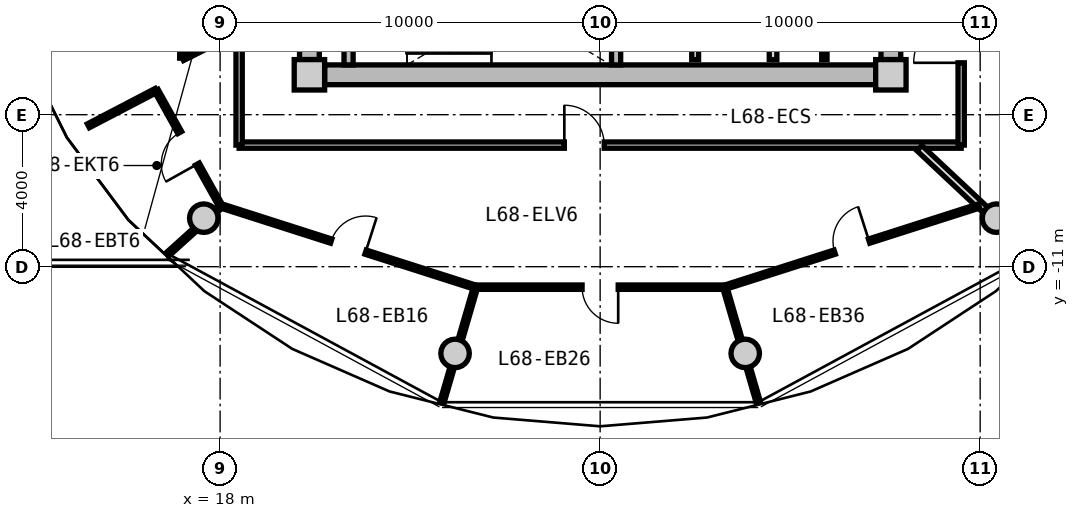
"""IFC4 building model, lengths in metres.
Left out: names, types, materials, properties, quantities, classifications, styles, units other than length and angle.
Written with IfcOpenShell. Run it as: python <this file> out.ifc"""

import sys

from ifc_helpers import new_model, si_unit, direction, frame, frame_2d, origin, origin_2d, place, context, subcontext, project, spatial, rectangle, circle, extrude, source, transform, mapped, element, fill, save


model = new_model("IFC4")
c1 = context("Model", 3, precision=1e-05, world=origin(), true_north=direction((0.0, 1.0)))
c2 = subcontext(c1, "Body", "Model", "MODEL_VIEW")
j1 = project(units=[si_unit("LENGTHUNIT", "METRE"), si_unit("PLANEANGLEUNIT", "RADIAN")], contexts=[c1])
p1 = place(None, origin())
s1 = spatial("IfcSite", under=j1, at=p1, CompositionType="ELEMENT")
p2 = place(p1, origin())
s2 = spatial("IfcBuilding", under=s1, at=p2, CompositionType="ELEMENT")
p3 = place(p2, frame((0.0, 0.0, 220.0)))
s3 = spatial("IfcBuildingStorey", under=s2, at=p3, CompositionType="ELEMENT", Elevation=220.0)
m1 = source(origin(), c2, "Body", "SweptSolid", [
    extrude(rectangle(XDim=0.8, YDim=0.8, at=origin_2d()), origin(), (0.0, 0.0, 1.0), 3.05),
])
for number, where, z_axis, x_axis in (
    (1, (20.35, -5.95, 0.0), (0.0, 0.0, 1.0), (1.0, 0.0, 0.0)),
    (2, (35.65, -5.95, 0.0), (0.0, 0.0, 1.0), (1.0, 0.0, 0.0)),
):
    element("IfcColumn", number, at=place(p3, frame(where, z_axis=z_axis, x_axis=x_axis)), inside=s3, PredefinedType="COLUMN", context=c2, shape_type="MappedRepresentation", body=[
        mapped(m1, transform((0.0, 0.0, 0.0), x_axis=(1.0, 0.0, 0.0), y_axis=(0.0, 1.0, 0.0), z_axis=(0.0, 0.0, 1.0), scale=1.0)),
    ])
m2 = source(origin(), c2, "Body", "SweptSolid", [
    extrude(rectangle(XDim=14.5, YDim=0.52, at=frame_2d((7.25, 0.0))), origin(), (0.0, 0.0, 1.0), 2.76),
])
p4 = place(p3, frame((35.25, -5.95, 0.0), z_axis=(0.0, 0.0, 1.0), x_axis=(-1.0, 0.0, 0.0)))
e3 = element("IfcWall", 3, at=p4, inside=s3, PredefinedType="SHEAR", context=c2, shape_type="MappedRepresentation", body=[
    mapped(m2, transform((0.0, 0.0, 0.0), x_axis=(1.0, 0.0, 0.0), y_axis=(0.0, 1.0, 0.0), z_axis=(0.0, 0.0, 1.0), scale=1.0)),
])
m3 = source(origin(), c2, "Body", "SweptSolid", [
    extrude(rectangle(XDim=11.1, YDim=0.52, at=frame_2d((5.55, 0.0))), origin(), (0.0, 0.0, 1.0), 2.76),
])
p5 = place(p3, frame((20.35, -5.55, 0.0), z_axis=(0.0, 0.0, 1.0), x_axis=(0.0, 1.0, 0.0)))
e4 = element("IfcWall", 4, at=p5, inside=s3, PredefinedType="SHEAR", context=c2, shape_type="MappedRepresentation", body=[
    mapped(m3, transform((0.0, 0.0, 0.0), x_axis=(1.0, 0.0, 0.0), y_axis=(0.0, 1.0, 0.0), z_axis=(0.0, 0.0, 1.0), scale=1.0)),
])
p6 = place(p5, frame((3.8, 0.0, 0.0)))
e5 = element("IfcOpeningElement", 5, at=p6, cuts=e4, PredefinedType="OPENING", context=c2, shape_type="SweptSolid", body=[
    extrude(rectangle(XDim=1.2, YDim=2.15, at=frame_2d((0.6, 1.075))), frame((0.0, 0.27, 0.0), z_axis=(0.0, -1.0, 0.0), x_axis=(1.0, 0.0, 0.0)), (0.0, 0.0, 1.0), 0.54),
])
p7 = place(p3, frame((35.65, 5.55, 0.0), z_axis=(0.0, 0.0, 1.0), x_axis=(0.0, -1.0, 0.0)))
e6 = element("IfcWall", 6, at=p7, inside=s3, PredefinedType="SHEAR", context=c2, shape_type="MappedRepresentation", body=[
    mapped(m3, transform((0.0, 0.0, 0.0), x_axis=(1.0, 0.0, 0.0), y_axis=(0.0, 1.0, 0.0), z_axis=(0.0, 0.0, 1.0), scale=1.0)),
])
p8 = place(p7, frame((5.65, 0.0, 0.0)))
e7 = element("IfcOpeningElement", 7, at=p8, cuts=e6, PredefinedType="OPENING", context=c2, shape_type="SweptSolid", body=[
    extrude(rectangle(XDim=1.2, YDim=2.15, at=frame_2d((0.6, 1.075))), frame((0.0, 0.27, 0.0), z_axis=(0.0, -1.0, 0.0), x_axis=(1.0, 0.0, 0.0)), (0.0, 0.0, 1.0), 0.54),
])
m4 = source(origin(), c2, "Body", "SweptSolid", [
    extrude(circle(Radius=0.375, at=origin_2d()), origin(), (0.0, 0.0, 1.0), 3.05),
])
for number, where, z_axis, x_axis in (
    (8, (17.57, -9.723, 0.0), (0.0, 0.0, 1.0), (1.0, 0.0, 0.0)),
    (9, (24.182, -13.281, 0.0), (0.0, 0.0, 1.0), (1.0, 0.0, 0.0)),
    (10, (31.818, -13.281, 0.0), (0.0, 0.0, 1.0), (1.0, 0.0, 0.0)),
    (11, (38.43, -9.723, 0.0), (0.0, 0.0, 1.0), (1.0, 0.0, 0.0)),
):
    element("IfcColumn", number, at=place(p3, frame(where, z_axis=z_axis, x_axis=x_axis)), inside=s3, PredefinedType="COLUMN", context=c2, shape_type="MappedRepresentation", body=[
        mapped(m4, transform((0.0, 0.0, 0.0), x_axis=(1.0, 0.0, 0.0), y_axis=(0.0, 1.0, 0.0), z_axis=(0.0, 0.0, 1.0), scale=1.0)),
    ])
m5 = source(origin(), c2, "Body", "SweptSolid", [
    extrude(rectangle(XDim=3.24, YDim=0.24, at=frame_2d((1.62, 0.0))), origin(), (0.0, 0.0, 1.0), 2.76),
])
for number, where, z_axis, x_axis in (
    (12, (21.38, -5.69, 0.0), (0.0, 0.0, 1.0), (0.0, 1.0, 0.0)),
    (13, (28.42, -5.69, 0.0), (0.0, 0.0, 1.0), (0.0, 1.0, 0.0)),
):
    element("IfcWall", number, at=place(p3, frame(where, z_axis=z_axis, x_axis=x_axis)), inside=s3, PredefinedType="PARTITIONING", context=c2, shape_type="MappedRepresentation", body=[
        mapped(m5, transform((0.0, 0.0, 0.0), x_axis=(1.0, 0.0, 0.0), y_axis=(0.0, 1.0, 0.0), z_axis=(0.0, 0.0, 1.0), scale=1.0)),
    ])
m6 = source(origin(), c2, "Body", "SweptSolid", [
    extrude(rectangle(XDim=3.8, YDim=0.2, at=frame_2d((1.9, 0.0))), origin(), (0.0, 0.0, 1.0), 2.745),
])
p9 = place(p3, frame((32.55, -5.55, 0.0), z_axis=(0.0, 0.0, 1.0), x_axis=(0.0, 1.0, 0.0)))
e14 = element("IfcWall", 14, at=p9, inside=s3, PredefinedType="PARTITIONING", context=c2, shape_type="MappedRepresentation", body=[
    mapped(m6, transform((0.0, 0.0, 0.0), x_axis=(1.0, 0.0, 0.0), y_axis=(0.0, 1.0, 0.0), z_axis=(0.0, 0.0, 1.0), scale=1.0)),
])
m7 = source(origin(), c2, "Body", "SweptSolid", [
    extrude(rectangle(XDim=4.2, YDim=0.18, at=frame_2d((2.1, 0.0))), origin(), (0.0, 0.0, 1.0), 2.745),
])
p10 = place(p3, frame((30.5, -5.55, 0.0), z_axis=(0.0, 0.0, 1.0), x_axis=(0.0, 1.0, 0.0)))
e15 = element("IfcWall", 15, at=p10, inside=s3, PredefinedType="PARTITIONING", context=c2, shape_type="MappedRepresentation", body=[
    mapped(m7, transform((0.0, 0.0, 0.0), x_axis=(1.0, 0.0, 0.0), y_axis=(0.0, 1.0, 0.0), z_axis=(0.0, 0.0, 1.0), scale=1.0)),
])
m8 = source(origin(), c2, "Body", "SweptSolid", [
    extrude(rectangle(XDim=3.8, YDim=0.14, at=frame_2d((1.9, 0.0))), origin(), (0.0, 0.0, 1.0), 2.745),
])
p11 = place(p3, frame((33.9, -5.55, 0.0), z_axis=(0.0, 0.0, 1.0), x_axis=(0.0, 1.0, 0.0)))
e16 = element("IfcWall", 16, at=p11, inside=s3, PredefinedType="PARTITIONING", context=c2, shape_type="MappedRepresentation", body=[
    mapped(m8, transform((0.0, 0.0, 0.0), x_axis=(1.0, 0.0, 0.0), y_axis=(0.0, 1.0, 0.0), z_axis=(0.0, 0.0, 1.0), scale=1.0)),
])
m9 = source(origin(), c2, "Body", "SweptSolid", [
    extrude(rectangle(XDim=19.0, YDim=0.165, at=frame_2d((9.5, 0.0))), origin(), (0.0, 0.0, 1.0), 2.745),
])
p12 = place(p3, frame((37.5, -7.8, 0.0), z_axis=(0.0, 0.0, 1.0), x_axis=(-1.0, 0.0, 0.0)))
e17 = element("IfcWall", 17, at=p12, inside=s3, PredefinedType="PARTITIONING", context=c2, shape_type="MappedRepresentation", body=[
    mapped(m9, transform((0.0, 0.0, 0.0), x_axis=(1.0, 0.0, 0.0), y_axis=(0.0, 1.0, 0.0), z_axis=(0.0, 0.0, 1.0), scale=1.0)),
])
p13 = place(p12, frame((9.392, 0.0, 0.0)))
e18 = element("IfcOpeningElement", 18, at=p13, cuts=e17, PredefinedType="OPENING", context=c2, shape_type="SweptSolid", body=[
    extrude(rectangle(XDim=1.05, YDim=2.15, at=frame_2d((0.525, 1.075))), frame((0.0, 0.093, 0.0), z_axis=(0.0, -1.0, 0.0), x_axis=(1.0, 0.0, 0.0)), (0.0, 0.0, 1.0), 0.185),
])
m10 = source(origin(), c2, "Body", "SweptSolid", [
    extrude(rectangle(XDim=6.88, YDim=0.165, at=frame_2d((3.44, 0.0))), origin(), (0.0, 0.0, 1.0), 2.745),
])
p14 = place(p3, frame((18.5, -7.8, 0.0), z_axis=(0.0, 0.0, 1.0), x_axis=(0.0, 1.0, 0.0)))
e19 = element("IfcWall", 19, at=p14, inside=s3, PredefinedType="PARTITIONING", context=c2, shape_type="MappedRepresentation", body=[
    mapped(m10, transform((0.0, 0.0, 0.0), x_axis=(1.0, 0.0, 0.0), y_axis=(0.0, 1.0, 0.0), z_axis=(0.0, 0.0, 1.0), scale=1.0)),
])
p15 = place(p3, frame((37.5, -0.92, 0.0), z_axis=(0.0, 0.0, 1.0), x_axis=(0.0, -1.0, 0.0)))
e20 = element("IfcWall", 20, at=p15, inside=s3, PredefinedType="PARTITIONING", context=c2, shape_type="MappedRepresentation", body=[
    mapped(m10, transform((0.0, 0.0, 0.0), x_axis=(1.0, 0.0, 0.0), y_axis=(0.0, 1.0, 0.0), z_axis=(0.0, 0.0, 1.0), scale=1.0)),
])
p16 = place(p15, frame((3.464, 0.0, 0.0)))
e21 = element("IfcOpeningElement", 21, at=p16, cuts=e20, PredefinedType="OPENING", context=c2, shape_type="SweptSolid", body=[
    extrude(rectangle(XDim=1.25, YDim=2.2, at=frame_2d((0.625, 1.1))), frame((0.0, 0.093, 0.0), z_axis=(0.0, -1.0, 0.0), x_axis=(1.0, 0.0, 0.0)), (0.0, 0.0, 1.0), 0.185),
])
m11 = source(origin(), c2, "Body", "SweptSolid", [
    extrude(rectangle(XDim=4.089, YDim=0.19, at=frame_2d((2.044, 0.0))), origin(), (0.0, 0.0, 1.0), 2.345),
])
p17 = place(p3, frame((36.402, -7.88, 0.0), z_axis=(0.0, 0.0, 1.0), x_axis=(0.729401273609, -0.684086092577, 0.0)))
e22 = element("IfcWall", 22, at=p17, inside=s3, PredefinedType="PARTITIONING", context=c2, shape_type="MappedRepresentation", body=[
    mapped(m11, transform((0.0, 0.0, 0.0), x_axis=(1.0, 0.0, 0.0), y_axis=(0.0, 1.0, 0.0), z_axis=(0.0, 0.0, 1.0), scale=1.0)),
])
m12 = source(origin(), c2, "Body", "SweptSolid", [
    extrude(rectangle(XDim=7.024, YDim=0.115, at=frame_2d((3.512, 0.0))), origin(), (0.0, 0.0, 1.0), 2.745),
])
p18 = place(p3, frame((18.03, -9.401, 0.0), z_axis=(0.0, 0.0, 1.0), x_axis=(0.952454006655, -0.304682400552, 0.0)))
e23 = element("IfcWall", 23, at=p18, inside=s3, PredefinedType="PARTITIONING", context=c2, shape_type="MappedRepresentation", body=[
    mapped(m12, transform((0.0, 0.0, 0.0), x_axis=(1.0, 0.0, 0.0), y_axis=(0.0, 1.0, 0.0), z_axis=(0.0, 0.0, 1.0), scale=1.0)),
])
p19 = place(p18, frame((3.037, 0.0, 0.0)))
e24 = element("IfcOpeningElement", 24, at=p19, cuts=e23, PredefinedType="OPENING", context=c2, shape_type="SweptSolid", body=[
    extrude(rectangle(XDim=0.95, YDim=2.1, at=frame_2d((0.475, 1.05))), frame((0.0, 0.067, 0.0), z_axis=(0.0, -1.0, 0.0), x_axis=(1.0, 0.0, 0.0)), (0.0, 0.0, 1.0), 0.135),
])
m13 = source(origin(), c2, "Body", "SweptSolid", [
    extrude(rectangle(XDim=1.905, YDim=0.115, at=frame_2d((0.953, 0.0))), origin(), (0.0, 0.0, 1.0), 2.345),
])
p20 = place(p3, frame((18.03, -9.401, 0.0), z_axis=(0.0, 0.0, 1.0), x_axis=(-0.742624708137, -0.669707804094, 0.0)))
e25 = element("IfcWall", 25, at=p20, inside=s3, PredefinedType="PARTITIONING", context=c2, shape_type="MappedRepresentation", body=[
    mapped(m13, transform((0.0, 0.0, 0.0), x_axis=(1.0, 0.0, 0.0), y_axis=(0.0, 1.0, 0.0), z_axis=(0.0, 0.0, 1.0), scale=1.0)),
])
m14 = source(origin(), c2, "Body", "SweptSolid", [
    extrude(rectangle(XDim=6.558, YDim=0.115, at=frame_2d((3.279, 0.0))), origin(), (0.0, 0.0, 1.0), 2.745),
])
p21 = place(p3, frame((24.721, -11.539, 0.0), z_axis=(0.0, 0.0, 1.0), x_axis=(1.0, 0.0, 0.0)))
e26 = element("IfcWall", 26, at=p21, inside=s3, PredefinedType="PARTITIONING", context=c2, shape_type="MappedRepresentation", body=[
    mapped(m14, transform((0.0, 0.0, 0.0), x_axis=(1.0, 0.0, 0.0), y_axis=(0.0, 1.0, 0.0), z_axis=(0.0, 0.0, 1.0), scale=1.0)),
])
p22 = place(p21, frame((2.804, 0.0, 0.0)))
e27 = element("IfcOpeningElement", 27, at=p22, cuts=e26, PredefinedType="OPENING", context=c2, shape_type="SweptSolid", body=[
    extrude(rectangle(XDim=0.95, YDim=2.1, at=frame_2d((0.475, 1.05))), frame((0.0, 0.067, 0.0), z_axis=(0.0, -1.0, 0.0), x_axis=(1.0, 0.0, 0.0)), (0.0, 0.0, 1.0), 0.135),
])
m15 = source(origin(), c2, "Body", "SweptSolid", [
    extrude(rectangle(XDim=3.173, YDim=0.115, at=frame_2d((1.587, 0.0))), origin(), (0.0, 0.0, 1.0), 2.345),
])
p23 = place(p3, frame((24.721, -11.539, 0.0), z_axis=(0.0, 0.0, 1.0), x_axis=(-0.279878875918, -0.960035319566, 0.0)))
e28 = element("IfcWall", 28, at=p23, inside=s3, PredefinedType="PARTITIONING", context=c2, shape_type="MappedRepresentation", body=[
    mapped(m15, transform((0.0, 0.0, 0.0), x_axis=(1.0, 0.0, 0.0), y_axis=(0.0, 1.0, 0.0), z_axis=(0.0, 0.0, 1.0), scale=1.0)),
])
p24 = place(p3, frame((31.28, -11.542, 0.0), z_axis=(0.0, 0.0, 1.0), x_axis=(0.952454006655, 0.304682400552, 0.0)))
e29 = element("IfcWall", 29, at=p24, inside=s3, PredefinedType="PARTITIONING", context=c2, shape_type="MappedRepresentation", body=[
    mapped(m12, transform((0.0, 0.0, 0.0), x_axis=(1.0, 0.0, 0.0), y_axis=(0.0, 1.0, 0.0), z_axis=(0.0, 0.0, 1.0), scale=1.0)),
])
p25 = place(p24, frame((3.037, 0.0, 0.0)))
e30 = element("IfcOpeningElement", 30, at=p25, cuts=e29, PredefinedType="OPENING", context=c2, shape_type="SweptSolid", body=[
    extrude(rectangle(XDim=0.95, YDim=2.1, at=frame_2d((0.475, 1.05))), frame((0.0, 0.067, 0.0), z_axis=(0.0, -1.0, 0.0), x_axis=(1.0, 0.0, 0.0)), (0.0, 0.0, 1.0), 0.135),
])
m16 = source(origin(), c2, "Body", "SweptSolid", [
    extrude(rectangle(XDim=3.171, YDim=0.115, at=frame_2d((1.585, 0.0))), origin(), (0.0, 0.0, 1.0), 2.345),
])
p26 = place(p3, frame((31.28, -11.542, 0.0), z_axis=(0.0, 0.0, 1.0), x_axis=(0.279893554029, -0.960031040338, 0.0)))
e31 = element("IfcWall", 31, at=p26, inside=s3, PredefinedType="PARTITIONING", context=c2, shape_type="MappedRepresentation", body=[
    mapped(m16, transform((0.0, 0.0, 0.0), x_axis=(1.0, 0.0, 0.0), y_axis=(0.0, 1.0, 0.0), z_axis=(0.0, 0.0, 1.0), scale=1.0)),
])
m17 = source(origin(), c2, "Body", "SweptSolid", [
    extrude(rectangle(XDim=1.638, YDim=0.14, at=frame_2d((0.819, 0.0))), origin(), (0.0, 0.0, 1.0), 2.745),
])
p27 = place(p3, frame((18.47, -4.778, 0.0), z_axis=(0.0, 0.0, 1.0), x_axis=(-0.893919977945, -0.448226586707, 0.0)))
e32 = element("IfcWall", 32, at=p27, inside=s3, PredefinedType="PARTITIONING", context=c2, shape_type="MappedRepresentation", body=[
    mapped(m17, transform((0.0, 0.0, 0.0), x_axis=(1.0, 0.0, 0.0), y_axis=(0.0, 1.0, 0.0), z_axis=(0.0, 0.0, 1.0), scale=1.0)),
])
m18 = source(origin(), c2, "Body", "SweptSolid", [
    extrude(rectangle(XDim=2.759, YDim=0.14, at=frame_2d((1.379, 0.0))), origin(), (0.0, 0.0, 1.0), 2.745),
])
p28 = place(p3, frame((17.005, -5.513, 0.0), z_axis=(0.0, 0.0, 1.0), x_axis=(0.01194710728, 0.999928630767, 0.0)))
e33 = element("IfcWall", 33, at=p28, inside=s3, PredefinedType="PARTITIONING", context=c2, shape_type="MappedRepresentation", body=[
    mapped(m18, transform((0.0, 0.0, 0.0), x_axis=(1.0, 0.0, 0.0), y_axis=(0.0, 1.0, 0.0), z_axis=(0.0, 0.0, 1.0), scale=1.0)),
])
p29 = place(p28, frame((0.919, 0.0, 0.0)))
e34 = element("IfcOpeningElement", 34, at=p29, cuts=e33, PredefinedType="OPENING", context=c2, shape_type="SweptSolid", body=[
    extrude(rectangle(XDim=0.92, YDim=2.1, at=frame_2d((0.46, 1.05))), frame((0.0, 0.08, 0.0), z_axis=(0.0, -1.0, 0.0), x_axis=(1.0, 0.0, 0.0)), (0.0, 0.0, 1.0), 0.16),
])
m19 = source(origin(), c2, "Body", "SweptSolid", [
    extrude(rectangle(XDim=2.015, YDim=0.115, at=frame_2d((1.007, 0.0))), origin(), (0.0, 0.0, 1.0), 2.745),
])
p30 = place(p3, frame((16.318, -6.36, 0.0), z_axis=(0.0, 0.0, 1.0), x_axis=(-0.886437892009, -0.462847559797, 0.0)))
e35 = element("IfcWall", 35, at=p30, inside=s3, PredefinedType="PARTITIONING", context=c2, shape_type="MappedRepresentation", body=[
    mapped(m19, transform((0.0, 0.0, 0.0), x_axis=(1.0, 0.0, 0.0), y_axis=(0.0, 1.0, 0.0), z_axis=(0.0, 0.0, 1.0), scale=1.0)),
])
m20 = source(origin(), c2, "Body", "SweptSolid", [
    extrude(rectangle(XDim=3.493, YDim=0.115, at=frame_2d((1.746, 0.0))), origin(), (0.0, 0.0, 1.0), 2.745),
])
p31 = place(p3, frame((16.318, -6.36, 0.0), z_axis=(0.0, 0.0, 1.0), x_axis=(0.487896553961, -0.872901456427, 0.0)))
e36 = element("IfcWall", 36, at=p31, inside=s3, PredefinedType="PARTITIONING", context=c2, shape_type="MappedRepresentation", body=[
    mapped(m20, transform((0.0, 0.0, 0.0), x_axis=(1.0, 0.0, 0.0), y_axis=(0.0, 1.0, 0.0), z_axis=(0.0, 0.0, 1.0), scale=1.0)),
])
p32 = place(p31, frame((1.271, 0.0, 0.0)))
e37 = element("IfcOpeningElement", 37, at=p32, cuts=e36, PredefinedType="OPENING", context=c2, shape_type="SweptSolid", body=[
    extrude(rectangle(XDim=0.95, YDim=2.1, at=frame_2d((0.475, 1.05))), frame((0.0, 0.067, 0.0), z_axis=(0.0, -1.0, 0.0), x_axis=(1.0, 0.0, 0.0)), (0.0, 0.0, 1.0), 0.135),
])
m21 = source(origin(), c2, "Body", "SweptSolid", [
    extrude(rectangle(XDim=1.05, YDim=2.15, at=frame_2d((0.525, 1.075))), frame((0.0, 0.025, 0.0), z_axis=(0.0, -1.0, 0.0), x_axis=(1.0, 0.0, 0.0)), (0.0, 0.0, 1.0), 0.05),
])
p33 = place(p13, frame((1.05, 0.0, 0.0), z_axis=(0.0, 0.0, 1.0), x_axis=(-1.0, 0.0, 0.0)))
e38 = element("IfcDoor", 38, at=p33, inside=s3, OperationType="SINGLE_SWING_LEFT", PredefinedType="DOOR", context=c2, shape_type="MappedRepresentation", body=[
    mapped(m21, transform((0.0, 0.0, 0.0), x_axis=(1.0, 0.0, 0.0), y_axis=(0.0, 1.0, 0.0), z_axis=(0.0, 0.0, 1.0), scale=1.0)),
])
fill(e18, e38)
m22 = source(origin(), c2, "Body", "SweptSolid", [
    extrude(rectangle(XDim=0.95, YDim=2.1, at=frame_2d((0.475, 1.05))), frame((0.0, 0.025, 0.0), z_axis=(0.0, -1.0, 0.0), x_axis=(1.0, 0.0, 0.0)), (0.0, 0.0, 1.0), 0.05),
])
p34 = place(p32, frame((0.95, 0.0, 0.0), z_axis=(0.0, 0.0, 1.0), x_axis=(-1.0, 0.0, 0.0)))
e39 = element("IfcDoor", 39, at=p34, inside=s3, OperationType="SINGLE_SWING_LEFT", PredefinedType="DOOR", context=c2, shape_type="MappedRepresentation", body=[
    mapped(m22, transform((0.0, 0.0, 0.0), x_axis=(1.0, 0.0, 0.0), y_axis=(0.0, 1.0, 0.0), z_axis=(0.0, 0.0, 1.0), scale=1.0)),
])
fill(e37, e39)
p35 = place(p19, origin())
e40 = element("IfcDoor", 40, at=p35, inside=s3, OperationType="SINGLE_SWING_RIGHT", PredefinedType="DOOR", context=c2, shape_type="MappedRepresentation", body=[
    mapped(m22, transform((0.0, 0.0, 0.0), x_axis=(1.0, 0.0, 0.0), y_axis=(0.0, 1.0, 0.0), z_axis=(0.0, 0.0, 1.0), scale=1.0)),
])
fill(e24, e40)
p36 = place(p22, frame((0.95, 0.0, 0.0), z_axis=(0.0, 0.0, 1.0), x_axis=(-1.0, 0.0, 0.0)))
e41 = element("IfcDoor", 41, at=p36, inside=s3, OperationType="SINGLE_SWING_LEFT", PredefinedType="DOOR", context=c2, shape_type="MappedRepresentation", body=[
    mapped(m22, transform((0.0, 0.0, 0.0), x_axis=(1.0, 0.0, 0.0), y_axis=(0.0, 1.0, 0.0), z_axis=(0.0, 0.0, 1.0), scale=1.0)),
])
fill(e27, e41)
p37 = place(p25, origin())
e42 = element("IfcDoor", 42, at=p37, inside=s3, OperationType="SINGLE_SWING_RIGHT", PredefinedType="DOOR", context=c2, shape_type="MappedRepresentation", body=[
    mapped(m22, transform((0.0, 0.0, 0.0), x_axis=(1.0, 0.0, 0.0), y_axis=(0.0, 1.0, 0.0), z_axis=(0.0, 0.0, 1.0), scale=1.0)),
])
fill(e30, e42)
m23 = source(origin(), c2, "Body", "SweptSolid", [
    extrude(rectangle(XDim=1.25, YDim=2.2, at=frame_2d((0.625, 1.1))), frame((0.0, 0.025, 0.0), z_axis=(0.0, -1.0, 0.0), x_axis=(1.0, 0.0, 0.0)), (0.0, 0.0, 1.0), 0.05),
])
p38 = place(p16, frame((1.25, 0.0, 0.0), z_axis=(0.0, 0.0, 1.0), x_axis=(-1.0, 0.0, 0.0)))
e43 = element("IfcDoor", 43, at=p38, inside=s3, OperationType="SINGLE_SWING_LEFT", PredefinedType="DOOR", context=c2, shape_type="MappedRepresentation", body=[
    mapped(m23, transform((0.0, 0.0, 0.0), x_axis=(1.0, 0.0, 0.0), y_axis=(0.0, 1.0, 0.0), z_axis=(0.0, 0.0, 1.0), scale=1.0)),
])
fill(e21, e43)
save(model, sys.argv[1])
